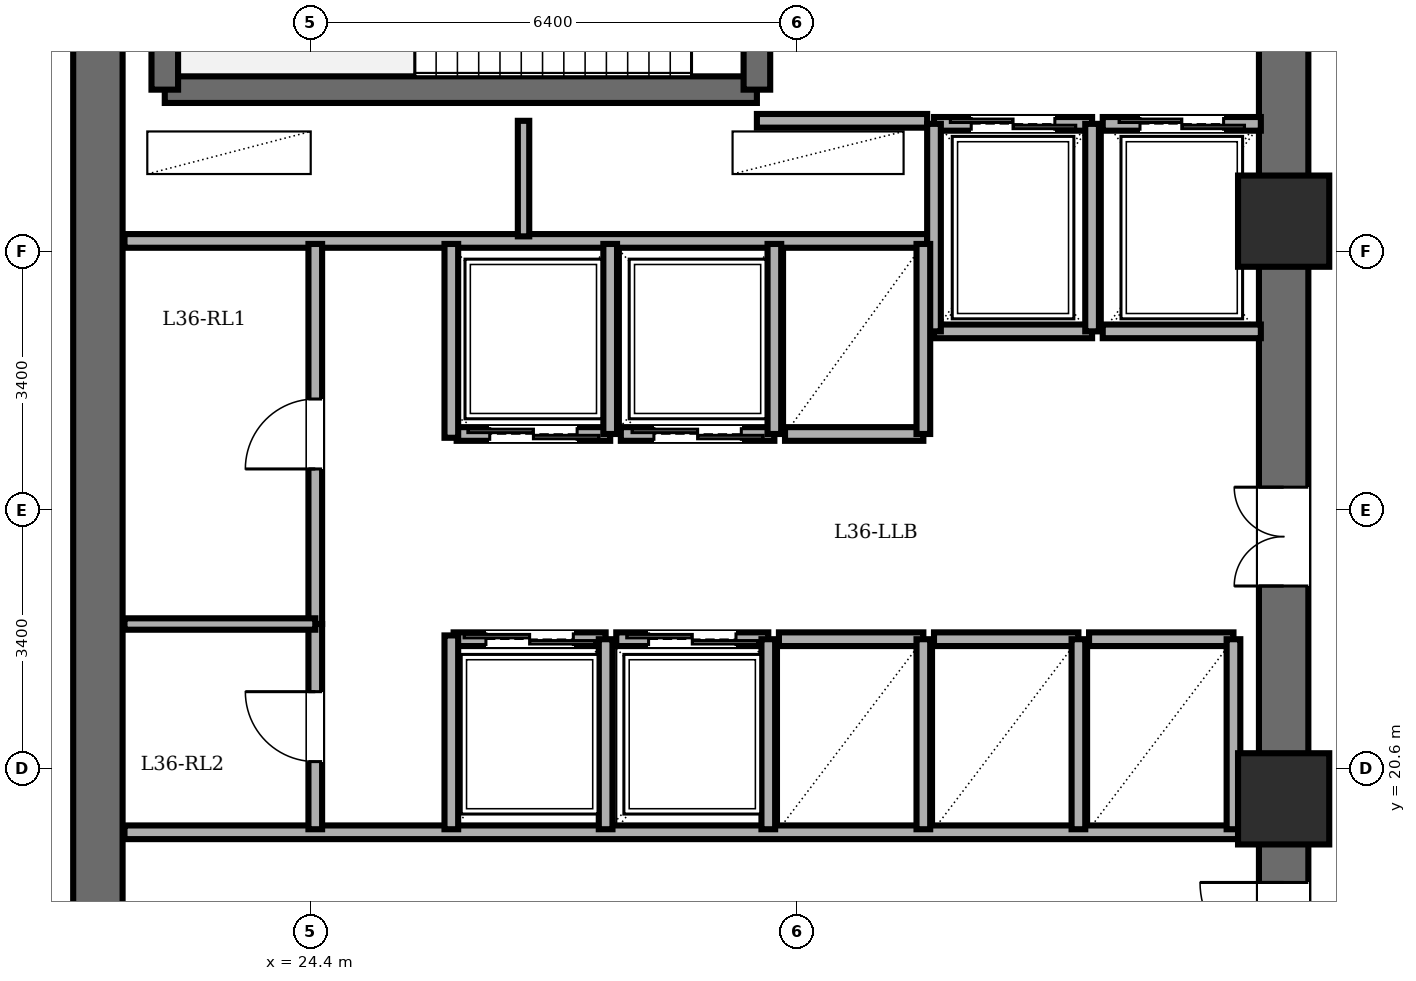
"""IFC4 building model, lengths in metres.
Left out: names, types, materials, properties, quantities, classifications, styles, units other than length and angle.
Written with IfcOpenShell. Run it as: python <this file> out.ifc"""

import sys

from ifc_helpers import new_model, si_unit, direction, frame, frame_2d, origin, origin_2d, place, context, subcontext, project, spatial, rectangle, extrude, element, fill, save


model = new_model("IFC4")
c1 = context("Model", 3, precision=1e-05, world=origin(), true_north=direction((0.0, 1.0)))
c2 = subcontext(c1, "Body", "Model", "MODEL_VIEW")
j1 = project(units=[si_unit("LENGTHUNIT", "METRE"), si_unit("PLANEANGLEUNIT", "RADIAN")], contexts=[c1])
p1 = place(None, origin())
s1 = spatial("IfcSite", under=j1, at=p1, CompositionType="ELEMENT")
p2 = place(p1, origin())
s2 = spatial("IfcBuilding", under=s1, at=p2, CompositionType="ELEMENT")
p3 = place(p2, frame((0.0, 0.0, 138.7)))
s3 = spatial("IfcBuildingStorey", under=s2, at=p3, CompositionType="ELEMENT", Elevation=138.7)
for number, where, z_axis, x_axis in (
    (1, (37.2, 20.2, 0.0), (0.0, 0.0, 1.0), (1.0, 0.0, 0.0)),
    (2, (37.2, 27.8, 0.0), (0.0, 0.0, 1.0), (1.0, 0.0, 0.0)),
):
    element("IfcColumn", number, at=place(p3, frame(where, z_axis=z_axis, x_axis=x_axis)), inside=s3, PredefinedType="COLUMN", context=c2, shape_type="SweptSolid", body=[
        extrude(rectangle(XDim=1.2, YDim=1.2, at=origin_2d()), origin(), (0.0, 0.0, 1.0), 5.1),
    ])
p4 = place(p3, frame((21.6, 14.4, 0.0), z_axis=(0.0, 0.0, 1.0), x_axis=(0.0, 1.0, 0.0)))
e3 = element("IfcWall", 3, at=p4, inside=s3, PredefinedType="SHEAR", context=c2, shape_type="SweptSolid", body=[
    extrude(rectangle(XDim=19.2, YDim=0.65, at=frame_2d((9.6, 0.0))), origin(), (0.0, 0.0, 1.0), 4.9),
])
p5 = place(p3, frame((37.2, 14.4, 0.0), z_axis=(0.0, 0.0, 1.0), x_axis=(0.0, 1.0, 0.0)))
e4 = element("IfcWall", 4, at=p5, inside=s3, PredefinedType="SHEAR", context=c2, shape_type="SweptSolid", body=[
    extrude(rectangle(XDim=19.2, YDim=0.65, at=frame_2d((9.6, 0.0))), origin(), (0.0, 0.0, 1.0), 4.9),
])
p6 = place(p5, frame((15.8, 0.0, 0.0)))
e5 = element("IfcOpeningElement", 5, at=p6, cuts=e4, PredefinedType="OPENING", context=c2, shape_type="SweptSolid", body=[
    extrude(rectangle(XDim=1.15, YDim=2.15, at=frame_2d((0.575, 1.075))), frame((0.0, 0.335, 0.0), z_axis=(0.0, -1.0, 0.0), x_axis=(1.0, 0.0, 0.0)), (0.0, 0.0, 1.0), 0.67),
])
p7 = place(p5, frame((3.6, 0.0, 0.0)))
e6 = element("IfcOpeningElement", 6, at=p7, cuts=e4, PredefinedType="OPENING", context=c2, shape_type="SweptSolid", body=[
    extrude(rectangle(XDim=1.1, YDim=2.15, at=frame_2d((0.55, 1.075))), frame((0.0, 0.335, 0.0), z_axis=(0.0, -1.0, 0.0), x_axis=(1.0, 0.0, 0.0)), (0.0, 0.0, 1.0), 0.67),
])
p8 = place(p5, frame((8.6, 0.0, 0.0)))
e7 = element("IfcOpeningElement", 7, at=p8, cuts=e4, PredefinedType="OPENING", context=c2, shape_type="SweptSolid", body=[
    extrude(rectangle(XDim=1.3, YDim=2.2, at=frame_2d((0.65, 1.1))), frame((0.0, 0.335, 0.0), z_axis=(0.0, -1.0, 0.0), x_axis=(1.0, 0.0, 0.0)), (0.0, 0.0, 1.0), 0.67),
])
p9 = place(p3, frame((22.48, 29.53, 0.0), z_axis=(0.0, 0.0, 1.0), x_axis=(1.0, 0.0, 0.0)))
e8 = element("IfcWall", 8, at=p9, inside=s3, PredefinedType="SOLIDWALL", context=c2, shape_type="SweptSolid", body=[
    extrude(rectangle(XDim=7.79, YDim=0.35, at=frame_2d((3.895, 0.0))), origin(), (0.0, 0.0, 1.0), 4.9),
])
p10 = place(p3, frame((22.48, 29.53, 0.0), z_axis=(0.0, 0.0, 1.0), x_axis=(0.0, 1.0, 0.0)))
e9 = element("IfcWall", 9, at=p10, inside=s3, PredefinedType="SOLIDWALL", context=c2, shape_type="SweptSolid", body=[
    extrude(rectangle(XDim=3.58, YDim=0.35, at=frame_2d((1.79, 0.0))), origin(), (0.0, 0.0, 1.0), 4.9),
])
p11 = place(p3, frame((30.27, 29.53, 0.0), z_axis=(0.0, 0.0, 1.0), x_axis=(0.0, 1.0, 0.0)))
e10 = element("IfcWall", 10, at=p11, inside=s3, PredefinedType="SOLIDWALL", context=c2, shape_type="SweptSolid", body=[
    extrude(rectangle(XDim=3.58, YDim=0.35, at=frame_2d((1.79, 0.0))), origin(), (0.0, 0.0, 1.0), 4.9),
])
p12 = place(p11, frame((1.25, 0.0, 0.0)))
e11 = element("IfcOpeningElement", 11, at=p12, cuts=e10, PredefinedType="OPENING", context=c2, shape_type="SweptSolid", body=[
    extrude(rectangle(XDim=1.1, YDim=2.15, at=frame_2d((0.55, 1.075))), frame((0.0, 0.185, 0.0), z_axis=(0.0, -1.0, 0.0), x_axis=(1.0, 0.0, 0.0)), (0.0, 0.0, 1.0), 0.37),
])
p13 = place(p3, frame((30.27, 29.12, 0.0), z_axis=(0.0, 0.0, 1.0), x_axis=(1.0, 0.0, 0.0)))
e12 = element("IfcWall", 12, at=p13, inside=s3, PredefinedType="PARTITIONING", context=c2, shape_type="SweptSolid", body=[
    extrude(rectangle(XDim=2.24, YDim=0.18, at=frame_2d((1.12, 0.0))), origin(), (0.0, 0.0, 1.0), 4.9),
])
p14 = place(p3, frame((21.95, 27.54, 0.0), z_axis=(0.0, 0.0, 1.0), x_axis=(1.0, 0.0, 0.0)))
e13 = element("IfcWall", 13, at=p14, inside=s3, PredefinedType="PARTITIONING", context=c2, shape_type="SweptSolid", body=[
    extrude(rectangle(XDim=10.56, YDim=0.18, at=frame_2d((5.28, 0.0))), origin(), (0.0, 0.0, 1.0), 4.9),
])
p15 = place(p3, frame((27.2, 27.6, 0.0), z_axis=(0.0, 0.0, 1.0), x_axis=(0.0, 1.0, 0.0)))
e14 = element("IfcWall", 14, at=p15, inside=s3, PredefinedType="PARTITIONING", context=c2, shape_type="SweptSolid", body=[
    extrude(rectangle(XDim=1.52, YDim=0.15, at=frame_2d((0.76, 0.0))), origin(), (0.0, 0.0, 1.0), 4.9),
])
p16 = place(p3, frame((21.95, 19.76, 0.0), z_axis=(0.0, 0.0, 1.0), x_axis=(1.0, 0.0, 0.0)))
e15 = element("IfcWall", 15, at=p16, inside=s3, PredefinedType="PARTITIONING", context=c2, shape_type="SweptSolid", body=[
    extrude(rectangle(XDim=14.87, YDim=0.18, at=frame_2d((7.435, 0.0))), origin(), (0.0, 0.0, 1.0), 4.9),
])
p17 = place(p3, frame((32.6, 29.08, 0.0), z_axis=(0.0, 0.0, 1.0), x_axis=(1.0, 0.0, 0.0)))
e16 = element("IfcWall", 16, at=p17, inside=s3, PredefinedType="PARTITIONING", context=c2, shape_type="SweptSolid", body=[
    extrude(rectangle(XDim=2.08, YDim=0.18, at=frame_2d((1.04, 0.0))), origin(), (0.0, 0.0, 1.0), 4.9),
])
p18 = place(p17, frame((0.49, 0.0, 0.0)))
e17 = element("IfcOpeningElement", 17, at=p18, cuts=e16, PredefinedType="OPENING", context=c2, shape_type="SweptSolid", body=[
    extrude(rectangle(XDim=1.1, YDim=2.2, at=frame_2d((0.55, 1.1))), frame((0.0, 0.1, 0.0), z_axis=(0.0, -1.0, 0.0), x_axis=(1.0, 0.0, 0.0)), (0.0, 0.0, 1.0), 0.2),
])
p19 = place(p3, frame((34.68, 26.35, 0.0), z_axis=(0.0, 0.0, 1.0), x_axis=(-1.0, 0.0, 0.0)))
e18 = element("IfcWall", 18, at=p19, inside=s3, PredefinedType="PARTITIONING", context=c2, shape_type="SweptSolid", body=[
    extrude(rectangle(XDim=2.08, YDim=0.18, at=frame_2d((1.04, 0.0))), origin(), (0.0, 0.0, 1.0), 4.9),
])
for number, where, z_axis, x_axis in (
    (19, (34.68, 26.35, 0.0), (0.0, 0.0, 1.0), (0.0, 1.0, 0.0)),
    (20, (32.6, 29.08, 0.0), (0.0, 0.0, 1.0), (0.0, -1.0, 0.0)),
):
    element("IfcWall", number, at=place(p3, frame(where, z_axis=z_axis, x_axis=x_axis)), inside=s3, PredefinedType="PARTITIONING", context=c2, shape_type="SweptSolid", body=[
        extrude(rectangle(XDim=2.73, YDim=0.18, at=frame_2d((1.365, 0.0))), origin(), (0.0, 0.0, 1.0), 4.9),
    ])
p20 = place(p3, frame((34.82, 29.08, 0.0), z_axis=(0.0, 0.0, 1.0), x_axis=(1.0, 0.0, 0.0)))
e21 = element("IfcWall", 21, at=p20, inside=s3, PredefinedType="PARTITIONING", context=c2, shape_type="SweptSolid", body=[
    extrude(rectangle(XDim=2.08, YDim=0.18, at=frame_2d((1.04, 0.0))), origin(), (0.0, 0.0, 1.0), 4.9),
])
p21 = place(p20, frame((0.49, 0.0, 0.0)))
e22 = element("IfcOpeningElement", 22, at=p21, cuts=e21, PredefinedType="OPENING", context=c2, shape_type="SweptSolid", body=[
    extrude(rectangle(XDim=1.1, YDim=2.2, at=frame_2d((0.55, 1.1))), frame((0.0, 0.1, 0.0), z_axis=(0.0, -1.0, 0.0), x_axis=(1.0, 0.0, 0.0)), (0.0, 0.0, 1.0), 0.2),
])
p22 = place(p3, frame((36.9, 26.35, 0.0), z_axis=(0.0, 0.0, 1.0), x_axis=(-1.0, 0.0, 0.0)))
e23 = element("IfcWall", 23, at=p22, inside=s3, PredefinedType="PARTITIONING", context=c2, shape_type="SweptSolid", body=[
    extrude(rectangle(XDim=2.08, YDim=0.18, at=frame_2d((1.04, 0.0))), origin(), (0.0, 0.0, 1.0), 4.9),
])
p23 = place(p3, frame((28.34, 25.0, 0.0), z_axis=(0.0, 0.0, 1.0), x_axis=(-1.0, 0.0, 0.0)))
e24 = element("IfcWall", 24, at=p23, inside=s3, PredefinedType="PARTITIONING", context=c2, shape_type="SweptSolid", body=[
    extrude(rectangle(XDim=2.02, YDim=0.18, at=frame_2d((1.01, 0.0))), origin(), (0.0, 0.0, 1.0), 4.9),
])
p24 = place(p23, frame((0.435, 0.0, 0.0)))
e25 = element("IfcOpeningElement", 25, at=p24, cuts=e24, PredefinedType="OPENING", context=c2, shape_type="SweptSolid", body=[
    extrude(rectangle(XDim=1.15, YDim=2.2, at=frame_2d((0.575, 1.1))), frame((0.0, 0.1, 0.0), z_axis=(0.0, -1.0, 0.0), x_axis=(1.0, 0.0, 0.0)), (0.0, 0.0, 1.0), 0.2),
])
p25 = place(p3, frame((28.34, 25.0, 0.0), z_axis=(0.0, 0.0, 1.0), x_axis=(0.0, 1.0, 0.0)))
e26 = element("IfcWall", 26, at=p25, inside=s3, PredefinedType="PARTITIONING", context=c2, shape_type="SweptSolid", body=[
    extrude(rectangle(XDim=2.5, YDim=0.18, at=frame_2d((1.25, 0.0))), origin(), (0.0, 0.0, 1.0), 4.9),
])
p26 = place(p3, frame((30.5, 25.0, 0.0), z_axis=(0.0, 0.0, 1.0), x_axis=(-1.0, 0.0, 0.0)))
e27 = element("IfcWall", 27, at=p26, inside=s3, PredefinedType="PARTITIONING", context=c2, shape_type="SweptSolid", body=[
    extrude(rectangle(XDim=2.02, YDim=0.18, at=frame_2d((1.01, 0.0))), origin(), (0.0, 0.0, 1.0), 4.9),
])
p27 = place(p26, frame((0.435, 0.0, 0.0)))
e28 = element("IfcOpeningElement", 28, at=p27, cuts=e27, PredefinedType="OPENING", context=c2, shape_type="SweptSolid", body=[
    extrude(rectangle(XDim=1.15, YDim=2.2, at=frame_2d((0.575, 1.1))), frame((0.0, 0.1, 0.0), z_axis=(0.0, -1.0, 0.0), x_axis=(1.0, 0.0, 0.0)), (0.0, 0.0, 1.0), 0.2),
])
p28 = place(p3, frame((30.5, 25.0, 0.0), z_axis=(0.0, 0.0, 1.0), x_axis=(0.0, 1.0, 0.0)))
e29 = element("IfcWall", 29, at=p28, inside=s3, PredefinedType="PARTITIONING", context=c2, shape_type="SweptSolid", body=[
    extrude(rectangle(XDim=2.5, YDim=0.18, at=frame_2d((1.25, 0.0))), origin(), (0.0, 0.0, 1.0), 4.9),
])
p29 = place(p3, frame((26.28, 22.3, 0.0), z_axis=(0.0, 0.0, 1.0), x_axis=(1.0, 0.0, 0.0)))
e30 = element("IfcWall", 30, at=p29, inside=s3, PredefinedType="PARTITIONING", context=c2, shape_type="SweptSolid", body=[
    extrude(rectangle(XDim=2.0, YDim=0.18, at=frame_2d((1.0, 0.0))), origin(), (0.0, 0.0, 1.0), 4.9),
])
p30 = place(p29, frame((0.425, 0.0, 0.0)))
e31 = element("IfcOpeningElement", 31, at=p30, cuts=e30, PredefinedType="OPENING", context=c2, shape_type="SweptSolid", body=[
    extrude(rectangle(XDim=1.15, YDim=2.2, at=frame_2d((0.575, 1.1))), frame((0.0, 0.1, 0.0), z_axis=(0.0, -1.0, 0.0), x_axis=(1.0, 0.0, 0.0)), (0.0, 0.0, 1.0), 0.2),
])
p31 = place(p3, frame((28.28, 19.8, 0.0), z_axis=(0.0, 0.0, 1.0), x_axis=(0.0, 1.0, 0.0)))
e32 = element("IfcWall", 32, at=p31, inside=s3, PredefinedType="PARTITIONING", context=c2, shape_type="SweptSolid", body=[
    extrude(rectangle(XDim=2.5, YDim=0.18, at=frame_2d((1.25, 0.0))), origin(), (0.0, 0.0, 1.0), 4.9),
])
p32 = place(p3, frame((28.42, 22.3, 0.0), z_axis=(0.0, 0.0, 1.0), x_axis=(1.0, 0.0, 0.0)))
e33 = element("IfcWall", 33, at=p32, inside=s3, PredefinedType="PARTITIONING", context=c2, shape_type="SweptSolid", body=[
    extrude(rectangle(XDim=2.0, YDim=0.18, at=frame_2d((1.0, 0.0))), origin(), (0.0, 0.0, 1.0), 4.9),
])
p33 = place(p32, frame((0.425, 0.0, 0.0)))
e34 = element("IfcOpeningElement", 34, at=p33, cuts=e33, PredefinedType="OPENING", context=c2, shape_type="SweptSolid", body=[
    extrude(rectangle(XDim=1.15, YDim=2.2, at=frame_2d((0.575, 1.1))), frame((0.0, 0.1, 0.0), z_axis=(0.0, -1.0, 0.0), x_axis=(1.0, 0.0, 0.0)), (0.0, 0.0, 1.0), 0.2),
])
p34 = place(p3, frame((30.42, 19.8, 0.0), z_axis=(0.0, 0.0, 1.0), x_axis=(0.0, 1.0, 0.0)))
e35 = element("IfcWall", 35, at=p34, inside=s3, PredefinedType="PARTITIONING", context=c2, shape_type="SweptSolid", body=[
    extrude(rectangle(XDim=2.5, YDim=0.18, at=frame_2d((1.25, 0.0))), origin(), (0.0, 0.0, 1.0), 4.9),
])
p35 = place(p3, frame((32.46, 25.0, 0.0), z_axis=(0.0, 0.0, 1.0), x_axis=(-1.0, 0.0, 0.0)))
e36 = element("IfcWall", 36, at=p35, inside=s3, PredefinedType="PARTITIONING", context=c2, shape_type="SweptSolid", body=[
    extrude(rectangle(XDim=1.82, YDim=0.18, at=frame_2d((0.91, 0.0))), origin(), (0.0, 0.0, 1.0), 4.9),
])
p36 = place(p3, frame((32.46, 25.0, 0.0), z_axis=(0.0, 0.0, 1.0), x_axis=(0.0, 1.0, 0.0)))
e37 = element("IfcWall", 37, at=p36, inside=s3, PredefinedType="PARTITIONING", context=c2, shape_type="SweptSolid", body=[
    extrude(rectangle(XDim=2.5, YDim=0.18, at=frame_2d((1.25, 0.0))), origin(), (0.0, 0.0, 1.0), 4.9),
])
p37 = place(p3, frame((30.56, 22.3, 0.0), z_axis=(0.0, 0.0, 1.0), x_axis=(1.0, 0.0, 0.0)))
e38 = element("IfcWall", 38, at=p37, inside=s3, PredefinedType="PARTITIONING", context=c2, shape_type="SweptSolid", body=[
    extrude(rectangle(XDim=1.9, YDim=0.18, at=frame_2d((0.95, 0.0))), origin(), (0.0, 0.0, 1.0), 4.9),
])
p38 = place(p3, frame((32.46, 19.8, 0.0), z_axis=(0.0, 0.0, 1.0), x_axis=(0.0, 1.0, 0.0)))
e39 = element("IfcWall", 39, at=p38, inside=s3, PredefinedType="PARTITIONING", context=c2, shape_type="SweptSolid", body=[
    extrude(rectangle(XDim=2.5, YDim=0.18, at=frame_2d((1.25, 0.0))), origin(), (0.0, 0.0, 1.0), 4.9),
])
p39 = place(p3, frame((32.6, 22.3, 0.0), z_axis=(0.0, 0.0, 1.0), x_axis=(1.0, 0.0, 0.0)))
e40 = element("IfcWall", 40, at=p39, inside=s3, PredefinedType="PARTITIONING", context=c2, shape_type="SweptSolid", body=[
    extrude(rectangle(XDim=1.9, YDim=0.18, at=frame_2d((0.95, 0.0))), origin(), (0.0, 0.0, 1.0), 4.9),
])
p40 = place(p3, frame((34.5, 19.8, 0.0), z_axis=(0.0, 0.0, 1.0), x_axis=(0.0, 1.0, 0.0)))
e41 = element("IfcWall", 41, at=p40, inside=s3, PredefinedType="PARTITIONING", context=c2, shape_type="SweptSolid", body=[
    extrude(rectangle(XDim=2.5, YDim=0.18, at=frame_2d((1.25, 0.0))), origin(), (0.0, 0.0, 1.0), 4.9),
])
p41 = place(p3, frame((34.64, 22.3, 0.0), z_axis=(0.0, 0.0, 1.0), x_axis=(1.0, 0.0, 0.0)))
e42 = element("IfcWall", 42, at=p41, inside=s3, PredefinedType="PARTITIONING", context=c2, shape_type="SweptSolid", body=[
    extrude(rectangle(XDim=1.9, YDim=0.18, at=frame_2d((0.95, 0.0))), origin(), (0.0, 0.0, 1.0), 4.9),
])
p42 = place(p3, frame((36.54, 19.8, 0.0), z_axis=(0.0, 0.0, 1.0), x_axis=(0.0, 1.0, 0.0)))
e43 = element("IfcWall", 43, at=p42, inside=s3, PredefinedType="PARTITIONING", context=c2, shape_type="SweptSolid", body=[
    extrude(rectangle(XDim=2.5, YDim=0.18, at=frame_2d((1.25, 0.0))), origin(), (0.0, 0.0, 1.0), 4.9),
])
p43 = place(p3, frame((24.46, 22.5, 0.0), z_axis=(0.0, 0.0, 1.0), x_axis=(0.0, 1.0, 0.0)))
e44 = element("IfcWall", 44, at=p43, inside=s3, PredefinedType="PARTITIONING", context=c2, shape_type="SweptSolid", body=[
    extrude(rectangle(XDim=5.0, YDim=0.18, at=frame_2d((2.5, 0.0))), origin(), (0.0, 0.0, 1.0), 4.9),
])
p44 = place(p43, frame((2.04, 0.0, 0.0)))
e45 = element("IfcOpeningElement", 45, at=p44, cuts=e44, PredefinedType="OPENING", context=c2, shape_type="SweptSolid", body=[
    extrude(rectangle(XDim=0.92, YDim=2.1, at=frame_2d((0.46, 1.05))), frame((0.0, 0.1, 0.0), z_axis=(0.0, -1.0, 0.0), x_axis=(1.0, 0.0, 0.0)), (0.0, 0.0, 1.0), 0.2),
])
p45 = place(p3, frame((24.46, 19.8, 0.0), z_axis=(0.0, 0.0, 1.0), x_axis=(0.0, 1.0, 0.0)))
e46 = element("IfcWall", 46, at=p45, inside=s3, PredefinedType="PARTITIONING", context=c2, shape_type="SweptSolid", body=[
    extrude(rectangle(XDim=2.7, YDim=0.18, at=frame_2d((1.35, 0.0))), origin(), (0.0, 0.0, 1.0), 4.9),
])
p46 = place(p45, frame((0.89, 0.0, 0.0)))
e47 = element("IfcOpeningElement", 47, at=p46, cuts=e46, PredefinedType="OPENING", context=c2, shape_type="SweptSolid", body=[
    extrude(rectangle(XDim=0.92, YDim=2.1, at=frame_2d((0.46, 1.05))), frame((0.0, 0.1, 0.0), z_axis=(0.0, -1.0, 0.0), x_axis=(1.0, 0.0, 0.0)), (0.0, 0.0, 1.0), 0.2),
])
p47 = place(p3, frame((21.95, 22.5, 0.0), z_axis=(0.0, 0.0, 1.0), x_axis=(1.0, 0.0, 0.0)))
e48 = element("IfcWall", 48, at=p47, inside=s3, PredefinedType="PARTITIONING", context=c2, shape_type="SweptSolid", body=[
    extrude(rectangle(XDim=2.51, YDim=0.15, at=frame_2d((1.255, 0.0))), origin(), (0.0, 0.0, 1.0), 4.9),
])
for number, where, z_axis, x_axis in (
    (49, (26.25, 24.95, 0.0), (0.0, 0.0, 1.0), (0.0, 1.0, 0.0)),
    (50, (26.25, 19.8, 0.0), (0.0, 0.0, 1.0), (0.0, 1.0, 0.0)),
):
    element("IfcWall", number, at=place(p3, frame(where, z_axis=z_axis, x_axis=x_axis)), inside=s3, PredefinedType="PARTITIONING", context=c2, shape_type="SweptSolid", body=[
        extrude(rectangle(XDim=2.55, YDim=0.18, at=frame_2d((1.275, 0.0))), origin(), (0.0, 0.0, 1.0), 4.9),
    ])
p48 = place(p7, origin())
e51 = element("IfcDoor", 51, at=p48, inside=s3, OperationType="SINGLE_SWING_RIGHT", PredefinedType="DOOR", context=c2, shape_type="SweptSolid", body=[
    extrude(rectangle(XDim=1.1, YDim=2.15, at=frame_2d((0.55, 1.075))), frame((0.0, 0.025, 0.0), z_axis=(0.0, -1.0, 0.0), x_axis=(1.0, 0.0, 0.0)), (0.0, 0.0, 1.0), 0.05),
])
fill(e6, e51)
p49 = place(p18, origin())
e52 = element("IfcDoor", 52, at=p49, inside=s3, OperationType="DOUBLE_DOOR_SLIDING", PredefinedType="DOOR", context=c2, shape_type="SweptSolid", body=[
    extrude(rectangle(XDim=1.1, YDim=2.2, at=frame_2d((0.55, 1.1))), frame((0.0, 0.025, 0.0), z_axis=(0.0, -1.0, 0.0), x_axis=(1.0, 0.0, 0.0)), (0.0, 0.0, 1.0), 0.05),
])
fill(e17, e52)
p50 = place(p21, origin())
e53 = element("IfcDoor", 53, at=p50, inside=s3, OperationType="DOUBLE_DOOR_SLIDING", PredefinedType="DOOR", context=c2, shape_type="SweptSolid", body=[
    extrude(rectangle(XDim=1.1, YDim=2.2, at=frame_2d((0.55, 1.1))), frame((0.0, 0.025, 0.0), z_axis=(0.0, -1.0, 0.0), x_axis=(1.0, 0.0, 0.0)), (0.0, 0.0, 1.0), 0.05),
])
fill(e22, e53)
p51 = place(p24, origin())
e54 = element("IfcDoor", 54, at=p51, inside=s3, OperationType="DOUBLE_DOOR_SLIDING", PredefinedType="DOOR", context=c2, shape_type="SweptSolid", body=[
    extrude(rectangle(XDim=1.15, YDim=2.2, at=frame_2d((0.575, 1.1))), frame((0.0, 0.025, 0.0), z_axis=(0.0, -1.0, 0.0), x_axis=(1.0, 0.0, 0.0)), (0.0, 0.0, 1.0), 0.05),
])
fill(e25, e54)
p52 = place(p27, origin())
e55 = element("IfcDoor", 55, at=p52, inside=s3, OperationType="DOUBLE_DOOR_SLIDING", PredefinedType="DOOR", context=c2, shape_type="SweptSolid", body=[
    extrude(rectangle(XDim=1.15, YDim=2.2, at=frame_2d((0.575, 1.1))), frame((0.0, 0.025, 0.0), z_axis=(0.0, -1.0, 0.0), x_axis=(1.0, 0.0, 0.0)), (0.0, 0.0, 1.0), 0.05),
])
fill(e28, e55)
p53 = place(p30, origin())
e56 = element("IfcDoor", 56, at=p53, inside=s3, OperationType="DOUBLE_DOOR_SLIDING", PredefinedType="DOOR", context=c2, shape_type="SweptSolid", body=[
    extrude(rectangle(XDim=1.15, YDim=2.2, at=frame_2d((0.575, 1.1))), frame((0.0, 0.025, 0.0), z_axis=(0.0, -1.0, 0.0), x_axis=(1.0, 0.0, 0.0)), (0.0, 0.0, 1.0), 0.05),
])
fill(e31, e56)
p54 = place(p33, origin())
e57 = element("IfcDoor", 57, at=p54, inside=s3, OperationType="DOUBLE_DOOR_SLIDING", PredefinedType="DOOR", context=c2, shape_type="SweptSolid", body=[
    extrude(rectangle(XDim=1.15, YDim=2.2, at=frame_2d((0.575, 1.1))), frame((0.0, 0.025, 0.0), z_axis=(0.0, -1.0, 0.0), x_axis=(1.0, 0.0, 0.0)), (0.0, 0.0, 1.0), 0.05),
])
fill(e34, e57)
p55 = place(p44, origin())
e58 = element("IfcDoor", 58, at=p55, inside=s3, OperationType="SINGLE_SWING_LEFT", PredefinedType="DOOR", context=c2, shape_type="SweptSolid", body=[
    extrude(rectangle(XDim=0.92, YDim=2.1, at=frame_2d((0.46, 1.05))), frame((0.0, 0.025, 0.0), z_axis=(0.0, -1.0, 0.0), x_axis=(1.0, 0.0, 0.0)), (0.0, 0.0, 1.0), 0.05),
])
fill(e45, e58)
p56 = place(p46, origin())
e59 = element("IfcDoor", 59, at=p56, inside=s3, OperationType="SINGLE_SWING_RIGHT", PredefinedType="DOOR", context=c2, shape_type="SweptSolid", body=[
    extrude(rectangle(XDim=0.92, YDim=2.1, at=frame_2d((0.46, 1.05))), frame((0.0, 0.025, 0.0), z_axis=(0.0, -1.0, 0.0), x_axis=(1.0, 0.0, 0.0)), (0.0, 0.0, 1.0), 0.05),
])
fill(e47, e59)
p57 = place(p8, origin())
e60 = element("IfcDoor", 60, at=p57, inside=s3, OperationType="DOUBLE_DOOR_SINGLE_SWING", PredefinedType="DOOR", context=c2, shape_type="SweptSolid", body=[
    extrude(rectangle(XDim=1.3, YDim=2.2, at=frame_2d((0.65, 1.1))), frame((0.0, 0.025, 0.0), z_axis=(0.0, -1.0, 0.0), x_axis=(1.0, 0.0, 0.0)), (0.0, 0.0, 1.0), 0.05),
])
fill(e7, e60)
save(model, sys.argv[1])
